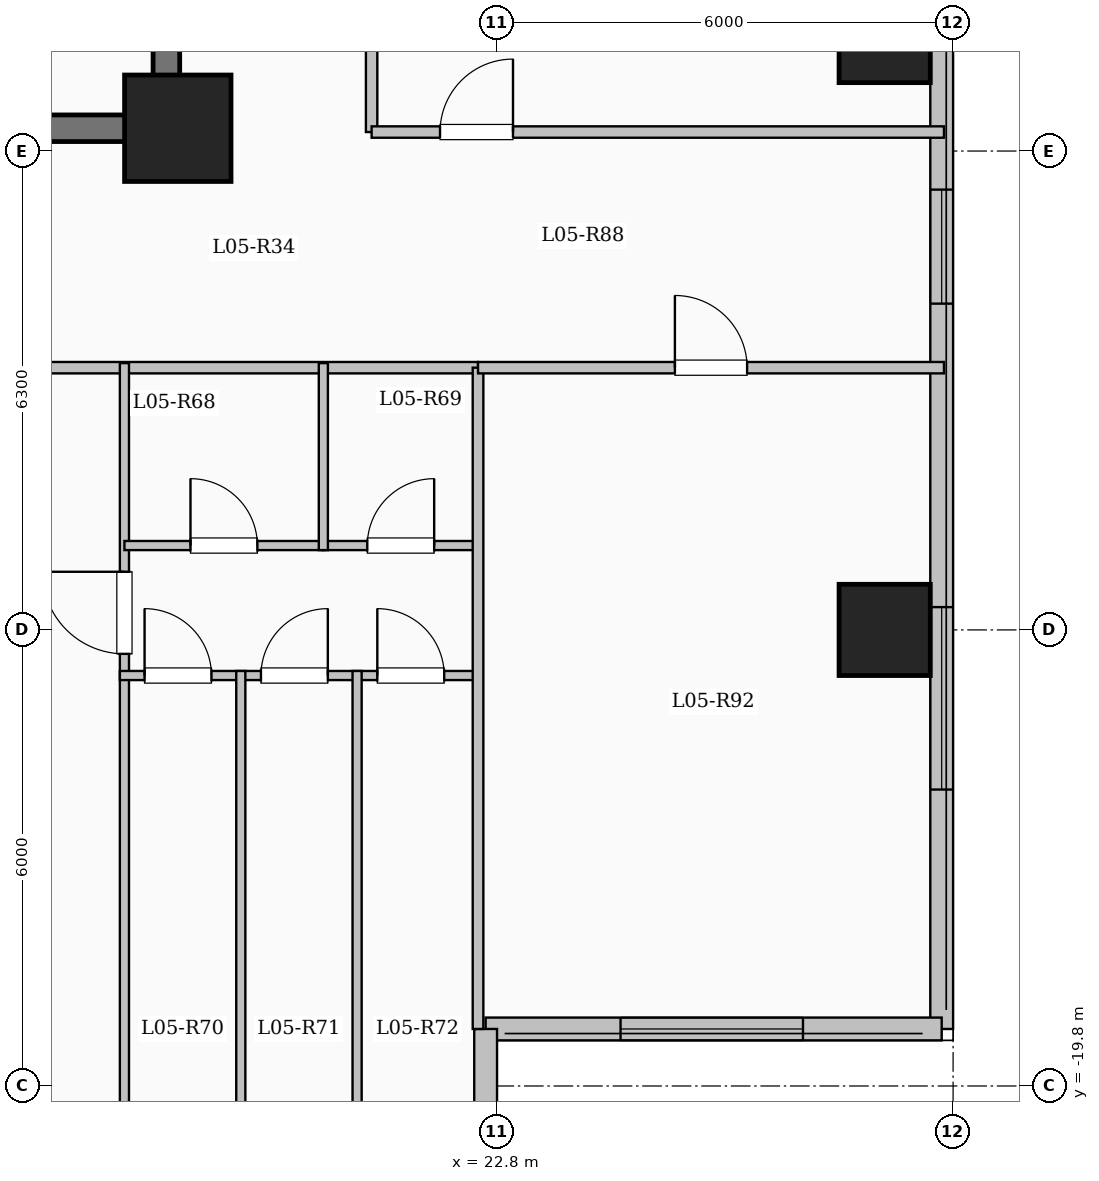
"""IFC4 building model, lengths in metres.
Left out: names, types, materials, properties, quantities, classifications, styles, units other than length and angle.
Written with IfcOpenShell. Run it as: python <this file> out.ifc"""

import sys

from ifc_helpers import new_model, si_unit, direction, frame, frame_2d, origin, origin_2d, place, context, subcontext, project, spatial, rectangle, extrude, element, fill, save


model = new_model("IFC4")
c1 = context("Model", 3, precision=1e-05, world=origin(), true_north=direction((0.0, 1.0)))
c2 = subcontext(c1, "Body", "Model", "MODEL_VIEW")
j1 = project(units=[si_unit("LENGTHUNIT", "METRE"), si_unit("PLANEANGLEUNIT", "RADIAN")], contexts=[c1])
p1 = place(None, origin())
s1 = spatial("IfcSite", under=j1, at=p1, CompositionType="ELEMENT")
p2 = place(p1, origin())
s2 = spatial("IfcBuilding", under=s1, at=p2, CompositionType="ELEMENT")
p3 = place(p2, frame((0.0, 0.0, 24.0)))
s3 = spatial("IfcBuildingStorey", under=s2, at=p3, CompositionType="ELEMENT", Elevation=24.0)
p4 = place(p3, frame((18.6, -7.2, 0.0), z_axis=(0.0, 0.0, 1.0), x_axis=(1.0, 0.0, 0.0)))
e1 = element("IfcColumn", 1, at=p4, inside=s3, PredefinedType="COLUMN", context=c2, shape_type="SweptSolid", body=[
    extrude(rectangle(XDim=1.4, YDim=1.4, at=origin_2d()), origin(), (0.0, 0.0, 1.0), 3.35),
])
for number, where, z_axis, x_axis in (
    (2, (27.9, -13.8, 0.0), (0.0, 0.0, 1.0), (1.0, 0.0, 0.0)),
    (3, (27.9, -6.0, 0.0), (0.0, 0.0, 1.0), (1.0, 0.0, 0.0)),
):
    element("IfcColumn", number, at=place(p3, frame(where, z_axis=z_axis, x_axis=x_axis)), inside=s3, PredefinedType="COLUMN", context=c2, shape_type="SweptSolid", body=[
        extrude(rectangle(XDim=1.2, YDim=1.2, at=origin_2d()), origin(), (0.0, 0.0, 1.0), 3.35),
    ])
p5 = place(p3, frame((28.65, 19.05, 0.0), z_axis=(0.0, 0.0, 1.0), x_axis=(0.0, -1.0, 0.0)))
e4 = element("IfcWall", 4, at=p5, inside=s3, PredefinedType="SOLIDWALL", context=c2, shape_type="SweptSolid", body=[
    extrude(rectangle(XDim=38.1, YDim=0.3, at=frame_2d((19.05, 0.0))), origin(), (0.0, 0.0, 1.0), 3.1),
])
p6 = place(p5, frame((2.275, 0.0, 0.9)))
e5 = element("IfcOpeningElement", 5, at=p6, cuts=e4, PredefinedType="OPENING", context=c2, shape_type="SweptSolid", body=[
    extrude(rectangle(XDim=2.0, YDim=1.7, at=frame_2d((1.0, 0.85))), frame((0.0, 0.16, 0.0), z_axis=(0.0, -1.0, 0.0), x_axis=(1.0, 0.0, 0.0)), (0.0, 0.0, 1.0), 0.32),
])
p7 = place(p5, frame((6.925, 0.0, 0.95)))
e6 = element("IfcOpeningElement", 6, at=p7, cuts=e4, PredefinedType="OPENING", context=c2, shape_type="SweptSolid", body=[
    extrude(rectangle(XDim=1.0, YDim=1.5, at=frame_2d((0.5, 0.75))), frame((0.0, 0.16, 0.0), z_axis=(0.0, -1.0, 0.0), x_axis=(1.0, 0.0, 0.0)), (0.0, 0.0, 1.0), 0.32),
])
p8 = place(p5, frame((10.175, 0.0, 0.9)))
e7 = element("IfcOpeningElement", 7, at=p8, cuts=e4, PredefinedType="OPENING", context=c2, shape_type="SweptSolid", body=[
    extrude(rectangle(XDim=2.0, YDim=1.7, at=frame_2d((1.0, 0.85))), frame((0.0, 0.16, 0.0), z_axis=(0.0, -1.0, 0.0), x_axis=(1.0, 0.0, 0.0)), (0.0, 0.0, 1.0), 0.32),
])
p9 = place(p5, frame((14.925, 0.0, 0.9)))
e8 = element("IfcOpeningElement", 8, at=p9, cuts=e4, PredefinedType="OPENING", context=c2, shape_type="SweptSolid", body=[
    extrude(rectangle(XDim=1.8, YDim=1.65, at=frame_2d((0.9, 0.825))), frame((0.0, 0.16, 0.0), z_axis=(0.0, -1.0, 0.0), x_axis=(1.0, 0.0, 0.0)), (0.0, 0.0, 1.0), 0.32),
])
p10 = place(p5, frame((20.75, 0.0, 0.9)))
e9 = element("IfcOpeningElement", 9, at=p10, cuts=e4, PredefinedType="OPENING", context=c2, shape_type="SweptSolid", body=[
    extrude(rectangle(XDim=2.4, YDim=1.8, at=frame_2d((1.2, 0.9))), frame((0.0, 0.16, 0.0), z_axis=(0.0, -1.0, 0.0), x_axis=(1.0, 0.0, 0.0)), (0.0, 0.0, 1.0), 0.32),
])
p11 = place(p5, frame((27.058, 0.0, 0.9)))
e10 = element("IfcOpeningElement", 10, at=p11, cuts=e4, PredefinedType="OPENING", context=c2, shape_type="SweptSolid", body=[
    extrude(rectangle(XDim=1.5, YDim=1.65, at=frame_2d((0.75, 0.825))), frame((0.0, 0.16, 0.0), z_axis=(0.0, -1.0, 0.0), x_axis=(1.0, 0.0, 0.0)), (0.0, 0.0, 1.0), 0.32),
])
p12 = place(p5, frame((32.55, 0.0, 0.9)))
e11 = element("IfcOpeningElement", 11, at=p12, cuts=e4, PredefinedType="OPENING", context=c2, shape_type="SweptSolid", body=[
    extrude(rectangle(XDim=2.4, YDim=1.8, at=frame_2d((1.2, 0.9))), frame((0.0, 0.16, 0.0), z_axis=(0.0, -1.0, 0.0), x_axis=(1.0, 0.0, 0.0)), (0.0, 0.0, 1.0), 0.32),
])
p13 = place(p3, frame((28.65, -19.05, 0.0), z_axis=(0.0, 0.0, 1.0), x_axis=(-1.0, 0.0, 0.0)))
e12 = element("IfcWall", 12, at=p13, inside=s3, PredefinedType="SOLIDWALL", context=c2, shape_type="SweptSolid", body=[
    extrude(rectangle(XDim=6.0, YDim=0.3, at=frame_2d((3.0, 0.0))), origin(), (0.0, 0.0, 1.0), 3.1),
])
p14 = place(p13, frame((1.825, 0.0, 0.9)))
e13 = element("IfcOpeningElement", 13, at=p14, cuts=e12, PredefinedType="OPENING", context=c2, shape_type="SweptSolid", body=[
    extrude(rectangle(XDim=2.4, YDim=1.8, at=frame_2d((1.2, 0.9))), frame((0.0, 0.16, 0.0), z_axis=(0.0, -1.0, 0.0), x_axis=(1.0, 0.0, 0.0)), (0.0, 0.0, 1.0), 0.32),
])
p15 = place(p3, frame((22.65, -19.05, 0.0), z_axis=(0.0, 0.0, 1.0), x_axis=(0.0, -1.0, 0.0)))
e14 = element("IfcWall", 14, at=p15, inside=s3, PredefinedType="SOLIDWALL", context=c2, shape_type="SweptSolid", body=[
    extrude(rectangle(XDim=4.5, YDim=0.3, at=frame_2d((2.25, 0.0))), origin(), (0.0, 0.0, 1.0), 3.1),
])
p16 = place(p15, frame((1.333, 0.0, 0.9)))
e15 = element("IfcOpeningElement", 15, at=p16, cuts=e14, PredefinedType="OPENING", context=c2, shape_type="SweptSolid", body=[
    extrude(rectangle(XDim=1.8, YDim=1.65, at=frame_2d((0.9, 0.825))), frame((0.0, 0.16, 0.0), z_axis=(0.0, -1.0, 0.0), x_axis=(1.0, 0.0, 0.0)), (0.0, 0.0, 1.0), 0.32),
])
p17 = place(p3, frame((18.45, -7.375, 0.0), z_axis=(0.0, 0.0, 1.0), x_axis=(0.0, 1.0, 0.0)))
e16 = element("IfcWall", 16, at=p17, inside=s3, PredefinedType="SHEAR", context=c2, shape_type="SweptSolid", body=[
    extrude(rectangle(XDim=14.05, YDim=0.35, at=frame_2d((7.025, 0.0))), origin(), (0.0, 0.0, 1.0), 3.35),
])
p18 = place(p3, frame((10.075, -7.2, 0.0), z_axis=(0.0, 0.0, 1.0), x_axis=(1.0, 0.0, 0.0)))
e17 = element("IfcWall", 17, at=p18, inside=s3, PredefinedType="SHEAR", context=c2, shape_type="SweptSolid", body=[
    extrude(rectangle(XDim=8.55, YDim=0.35, at=frame_2d((4.275, 0.0))), origin(), (0.0, 0.0, 1.0), 3.35),
])
p19 = place(p3, frame((21.15, -7.25, 0.0), z_axis=(0.0, 0.0, 1.0), x_axis=(0.0, 1.0, 0.0)))
e18 = element("IfcWall", 18, at=p19, inside=s3, PredefinedType="PARTITIONING", context=c2, shape_type="SweptSolid", body=[
    extrude(rectangle(XDim=18.0, YDim=0.15, at=frame_2d((9.0, 0.0))), origin(), (0.0, 0.0, 1.0), 2.585),
])
p20 = place(p3, frame((8.55, -10.35, 0.0), z_axis=(0.0, 0.0, 1.0), x_axis=(1.0, 0.0, 0.0)))
e19 = element("IfcWall", 19, at=p20, inside=s3, PredefinedType="PARTITIONING", context=c2, shape_type="SweptSolid", body=[
    extrude(rectangle(XDim=14.0, YDim=0.15, at=frame_2d((7.0, 0.0))), origin(), (0.0, 0.0, 1.0), 3.1),
])
p21 = place(p20, frame((0.75, 0.0, 0.0)))
e20 = element("IfcOpeningElement", 20, at=p21, cuts=e19, PredefinedType="OPENING", context=c2, shape_type="SweptSolid", body=[
    extrude(rectangle(XDim=0.96, YDim=2.15, at=frame_2d((0.48, 1.075))), frame((0.0, 0.085, 0.0), z_axis=(0.0, -1.0, 0.0), x_axis=(1.0, 0.0, 0.0)), (0.0, 0.0, 1.0), 0.17),
])
p22 = place(p20, frame((6.888, 0.0, 0.0)))
e21 = element("IfcOpeningElement", 21, at=p22, cuts=e19, PredefinedType="OPENING", context=c2, shape_type="SweptSolid", body=[
    extrude(rectangle(XDim=0.96, YDim=2.15, at=frame_2d((0.48, 1.075))), frame((0.0, 0.085, 0.0), z_axis=(0.0, -1.0, 0.0), x_axis=(1.0, 0.0, 0.0)), (0.0, 0.0, 1.0), 0.17),
])
p23 = place(p3, frame((17.898, -23.6, 0.0), z_axis=(0.0, 0.0, 1.0), x_axis=(0.0, 1.0, 0.0)))
e22 = element("IfcWall", 22, at=p23, inside=s3, PredefinedType="PARTITIONING", context=c2, shape_type="SweptSolid", body=[
    extrude(rectangle(XDim=13.31, YDim=0.12, at=frame_2d((6.655, 0.0))), origin(), (0.0, 0.0, 1.0), 3.1),
])
p24 = place(p23, frame((9.485, 0.0, 0.0)))
e23 = element("IfcOpeningElement", 23, at=p24, cuts=e22, PredefinedType="OPENING", context=c2, shape_type="SweptSolid", body=[
    extrude(rectangle(XDim=1.08, YDim=2.15, at=frame_2d((0.54, 1.075))), frame((0.0, 0.07, 0.0), z_axis=(0.0, -1.0, 0.0), x_axis=(1.0, 0.0, 0.0)), (0.0, 0.0, 1.0), 0.14),
])
p25 = place(p3, frame((17.898, -12.69, 0.0), z_axis=(0.0, 0.0, 1.0), x_axis=(1.0, 0.0, 0.0)))
e24 = element("IfcWall", 24, at=p25, inside=s3, PredefinedType="PARTITIONING", context=c2, shape_type="SweptSolid", body=[
    extrude(rectangle(XDim=2.617, YDim=0.12, at=frame_2d((1.309, 0.0))), origin(), (0.0, 0.0, 1.0), 3.1),
])
p26 = place(p25, frame((0.869, 0.0, 0.0)))
e25 = element("IfcOpeningElement", 25, at=p26, cuts=e24, PredefinedType="OPENING", context=c2, shape_type="SweptSolid", body=[
    extrude(rectangle(XDim=0.88, YDim=2.1, at=frame_2d((0.44, 1.05))), frame((0.0, 0.07, 0.0), z_axis=(0.0, -1.0, 0.0), x_axis=(1.0, 0.0, 0.0)), (0.0, 0.0, 1.0), 0.14),
])
p27 = place(p3, frame((20.515, -12.69, 0.0), z_axis=(0.0, 0.0, 1.0), x_axis=(1.0, 0.0, 0.0)))
e26 = element("IfcWall", 26, at=p27, inside=s3, PredefinedType="PARTITIONING", context=c2, shape_type="SweptSolid", body=[
    extrude(rectangle(XDim=2.035, YDim=0.12, at=frame_2d((1.018, 0.0))), origin(), (0.0, 0.0, 1.0), 3.1),
])
p28 = place(p27, frame((0.578, 0.0, 0.0)))
e27 = element("IfcOpeningElement", 27, at=p28, cuts=e26, PredefinedType="OPENING", context=c2, shape_type="SweptSolid", body=[
    extrude(rectangle(XDim=0.88, YDim=2.1, at=frame_2d((0.44, 1.05))), frame((0.0, 0.07, 0.0), z_axis=(0.0, -1.0, 0.0), x_axis=(1.0, 0.0, 0.0)), (0.0, 0.0, 1.0), 0.14),
])
p29 = place(p3, frame((17.838, -14.4, 0.0), z_axis=(0.0, 0.0, 1.0), x_axis=(1.0, 0.0, 0.0)))
e28 = element("IfcWall", 28, at=p29, inside=s3, PredefinedType="PARTITIONING", context=c2, shape_type="SweptSolid", body=[
    extrude(rectangle(XDim=4.772, YDim=0.12, at=frame_2d((2.386, 0.0))), origin(), (0.0, 0.0, 1.0), 3.1),
])
p30 = place(p29, frame((0.325, 0.0, 0.0)))
e29 = element("IfcOpeningElement", 29, at=p30, cuts=e28, PredefinedType="OPENING", context=c2, shape_type="SweptSolid", body=[
    extrude(rectangle(XDim=0.88, YDim=2.1, at=frame_2d((0.44, 1.05))), frame((0.0, 0.07, 0.0), z_axis=(0.0, -1.0, 0.0), x_axis=(1.0, 0.0, 0.0)), (0.0, 0.0, 1.0), 0.14),
])
p31 = place(p29, frame((1.856, 0.0, 0.0)))
e30 = element("IfcOpeningElement", 30, at=p31, cuts=e28, PredefinedType="OPENING", context=c2, shape_type="SweptSolid", body=[
    extrude(rectangle(XDim=0.88, YDim=2.1, at=frame_2d((0.44, 1.05))), frame((0.0, 0.07, 0.0), z_axis=(0.0, -1.0, 0.0), x_axis=(1.0, 0.0, 0.0)), (0.0, 0.0, 1.0), 0.14),
])
p32 = place(p29, frame((3.387, 0.0, 0.0)))
e31 = element("IfcOpeningElement", 31, at=p32, cuts=e28, PredefinedType="OPENING", context=c2, shape_type="SweptSolid", body=[
    extrude(rectangle(XDim=0.88, YDim=2.1, at=frame_2d((0.44, 1.05))), frame((0.0, 0.07, 0.0), z_axis=(0.0, -1.0, 0.0), x_axis=(1.0, 0.0, 0.0)), (0.0, 0.0, 1.0), 0.14),
])
p33 = place(p3, frame((20.515, -12.75, 0.0), z_axis=(0.0, 0.0, 1.0), x_axis=(0.0, 1.0, 0.0)))
e32 = element("IfcWall", 32, at=p33, inside=s3, PredefinedType="PARTITIONING", context=c2, shape_type="SweptSolid", body=[
    extrude(rectangle(XDim=2.46, YDim=0.12, at=frame_2d((1.23, 0.0))), origin(), (0.0, 0.0, 1.0), 3.1),
])
for number, where, z_axis, x_axis in (
    (33, (19.429, -23.6, 0.0), (0.0, 0.0, 1.0), (0.0, 1.0, 0.0)),
    (34, (20.959, -23.6, 0.0), (0.0, 0.0, 1.0), (0.0, 1.0, 0.0)),
):
    element("IfcWall", number, at=place(p3, frame(where, z_axis=z_axis, x_axis=x_axis)), inside=s3, PredefinedType="PARTITIONING", context=c2, shape_type="SweptSolid", body=[
        extrude(rectangle(XDim=9.26, YDim=0.12, at=frame_2d((4.63, 0.0))), origin(), (0.0, 0.0, 1.0), 3.1),
    ])
p34 = place(p3, frame((21.15, -7.25, 0.0), z_axis=(0.0, 0.0, 1.0), x_axis=(1.0, 0.0, 0.0)))
e35 = element("IfcWall", 35, at=p34, inside=s3, PredefinedType="PARTITIONING", context=c2, shape_type="SweptSolid", body=[
    extrude(rectangle(XDim=7.53, YDim=0.15, at=frame_2d((3.765, 0.0))), origin(), (0.0, 0.0, 1.0), 3.1),
])
p35 = place(p34, frame((0.9, 0.0, 0.0)))
e36 = element("IfcOpeningElement", 36, at=p35, cuts=e35, PredefinedType="OPENING", context=c2, shape_type="SweptSolid", body=[
    extrude(rectangle(XDim=0.96, YDim=2.15, at=frame_2d((0.48, 1.075))), frame((0.0, 0.085, 0.0), z_axis=(0.0, -1.0, 0.0), x_axis=(1.0, 0.0, 0.0)), (0.0, 0.0, 1.0), 0.17),
])
p36 = place(p3, frame((22.55, -19.05, 0.0), z_axis=(0.0, 0.0, 1.0), x_axis=(0.0, 1.0, 0.0)))
e37 = element("IfcWall", 37, at=p36, inside=s3, PredefinedType="PARTITIONING", context=c2, shape_type="SweptSolid", body=[
    extrude(rectangle(XDim=8.7, YDim=0.14, at=frame_2d((4.35, 0.0))), origin(), (0.0, 0.0, 1.0), 3.1),
])
p37 = place(p3, frame((22.55, -10.35, 0.0), z_axis=(0.0, 0.0, 1.0), x_axis=(1.0, 0.0, 0.0)))
e38 = element("IfcWall", 38, at=p37, inside=s3, PredefinedType="PARTITIONING", context=c2, shape_type="SweptSolid", body=[
    extrude(rectangle(XDim=6.13, YDim=0.15, at=frame_2d((3.065, 0.0))), origin(), (0.0, 0.0, 1.0), 3.1),
])
p38 = place(p37, frame((2.59, 0.0, 0.0)))
e39 = element("IfcOpeningElement", 39, at=p38, cuts=e38, PredefinedType="OPENING", context=c2, shape_type="SweptSolid", body=[
    extrude(rectangle(XDim=0.95, YDim=2.15, at=frame_2d((0.475, 1.075))), frame((0.0, 0.085, 0.0), z_axis=(0.0, -1.0, 0.0), x_axis=(1.0, 0.0, 0.0)), (0.0, 0.0, 1.0), 0.17),
])
p39 = place(p11, origin())
e40 = element("IfcWindow", 40, at=p39, inside=s3, PartitioningType="SINGLE_PANEL", PredefinedType="WINDOW", context=c2, shape_type="SweptSolid", body=[
    extrude(rectangle(XDim=1.5, YDim=1.65, at=frame_2d((0.75, 0.825))), frame((0.0, 0.03, 0.0), z_axis=(0.0, -1.0, 0.0), x_axis=(1.0, 0.0, 0.0)), (0.0, 0.0, 1.0), 0.06),
])
fill(e10, e40)
p40 = place(p12, origin())
e41 = element("IfcWindow", 41, at=p40, inside=s3, PartitioningType="SINGLE_PANEL", PredefinedType="WINDOW", context=c2, shape_type="SweptSolid", body=[
    extrude(rectangle(XDim=2.4, YDim=1.8, at=frame_2d((1.2, 0.9))), frame((0.0, 0.03, 0.0), z_axis=(0.0, -1.0, 0.0), x_axis=(1.0, 0.0, 0.0)), (0.0, 0.0, 1.0), 0.06),
])
fill(e11, e41)
p41 = place(p14, origin())
e42 = element("IfcWindow", 42, at=p41, inside=s3, PartitioningType="SINGLE_PANEL", PredefinedType="WINDOW", context=c2, shape_type="SweptSolid", body=[
    extrude(rectangle(XDim=2.4, YDim=1.8, at=frame_2d((1.2, 0.9))), frame((0.0, 0.03, 0.0), z_axis=(0.0, -1.0, 0.0), x_axis=(1.0, 0.0, 0.0)), (0.0, 0.0, 1.0), 0.06),
])
fill(e13, e42)
p42 = place(p24, origin())
e43 = element("IfcDoor", 43, at=p42, inside=s3, OperationType="SINGLE_SWING_RIGHT", PredefinedType="DOOR", context=c2, shape_type="SweptSolid", body=[
    extrude(rectangle(XDim=1.08, YDim=2.15, at=frame_2d((0.54, 1.075))), frame((0.0, 0.025, 0.0), z_axis=(0.0, -1.0, 0.0), x_axis=(1.0, 0.0, 0.0)), (0.0, 0.0, 1.0), 0.05),
])
fill(e23, e43)
p43 = place(p26, origin())
e44 = element("IfcDoor", 44, at=p43, inside=s3, OperationType="SINGLE_SWING_LEFT", PredefinedType="DOOR", context=c2, shape_type="SweptSolid", body=[
    extrude(rectangle(XDim=0.88, YDim=2.1, at=frame_2d((0.44, 1.05))), frame((0.0, 0.025, 0.0), z_axis=(0.0, -1.0, 0.0), x_axis=(1.0, 0.0, 0.0)), (0.0, 0.0, 1.0), 0.05),
])
fill(e25, e44)
p44 = place(p28, origin())
e45 = element("IfcDoor", 45, at=p44, inside=s3, OperationType="SINGLE_SWING_RIGHT", PredefinedType="DOOR", context=c2, shape_type="SweptSolid", body=[
    extrude(rectangle(XDim=0.88, YDim=2.1, at=frame_2d((0.44, 1.05))), frame((0.0, 0.025, 0.0), z_axis=(0.0, -1.0, 0.0), x_axis=(1.0, 0.0, 0.0)), (0.0, 0.0, 1.0), 0.05),
])
fill(e27, e45)
p45 = place(p30, origin())
e46 = element("IfcDoor", 46, at=p45, inside=s3, OperationType="SINGLE_SWING_LEFT", PredefinedType="DOOR", context=c2, shape_type="SweptSolid", body=[
    extrude(rectangle(XDim=0.88, YDim=2.1, at=frame_2d((0.44, 1.05))), frame((0.0, 0.025, 0.0), z_axis=(0.0, -1.0, 0.0), x_axis=(1.0, 0.0, 0.0)), (0.0, 0.0, 1.0), 0.05),
])
fill(e29, e46)
p46 = place(p31, origin())
e47 = element("IfcDoor", 47, at=p46, inside=s3, OperationType="SINGLE_SWING_RIGHT", PredefinedType="DOOR", context=c2, shape_type="SweptSolid", body=[
    extrude(rectangle(XDim=0.88, YDim=2.1, at=frame_2d((0.44, 1.05))), frame((0.0, 0.025, 0.0), z_axis=(0.0, -1.0, 0.0), x_axis=(1.0, 0.0, 0.0)), (0.0, 0.0, 1.0), 0.05),
])
fill(e30, e47)
p47 = place(p32, origin())
e48 = element("IfcDoor", 48, at=p47, inside=s3, OperationType="SINGLE_SWING_LEFT", PredefinedType="DOOR", context=c2, shape_type="SweptSolid", body=[
    extrude(rectangle(XDim=0.88, YDim=2.1, at=frame_2d((0.44, 1.05))), frame((0.0, 0.025, 0.0), z_axis=(0.0, -1.0, 0.0), x_axis=(1.0, 0.0, 0.0)), (0.0, 0.0, 1.0), 0.05),
])
fill(e31, e48)
p48 = place(p38, origin())
e49 = element("IfcDoor", 49, at=p48, inside=s3, OperationType="SINGLE_SWING_LEFT", PredefinedType="DOOR", context=c2, shape_type="SweptSolid", body=[
    extrude(rectangle(XDim=0.95, YDim=2.15, at=frame_2d((0.475, 1.075))), frame((0.0, 0.025, 0.0), z_axis=(0.0, -1.0, 0.0), x_axis=(1.0, 0.0, 0.0)), (0.0, 0.0, 1.0), 0.05),
])
fill(e39, e49)
p49 = place(p35, origin())
e50 = element("IfcDoor", 50, at=p49, inside=s3, OperationType="SINGLE_SWING_RIGHT", PredefinedType="DOOR", context=c2, shape_type="SweptSolid", body=[
    extrude(rectangle(XDim=0.96, YDim=2.15, at=frame_2d((0.48, 1.075))), frame((0.0, 0.025, 0.0), z_axis=(0.0, -1.0, 0.0), x_axis=(1.0, 0.0, 0.0)), (0.0, 0.0, 1.0), 0.05),
])
fill(e36, e50)
save(model, sys.argv[1])
